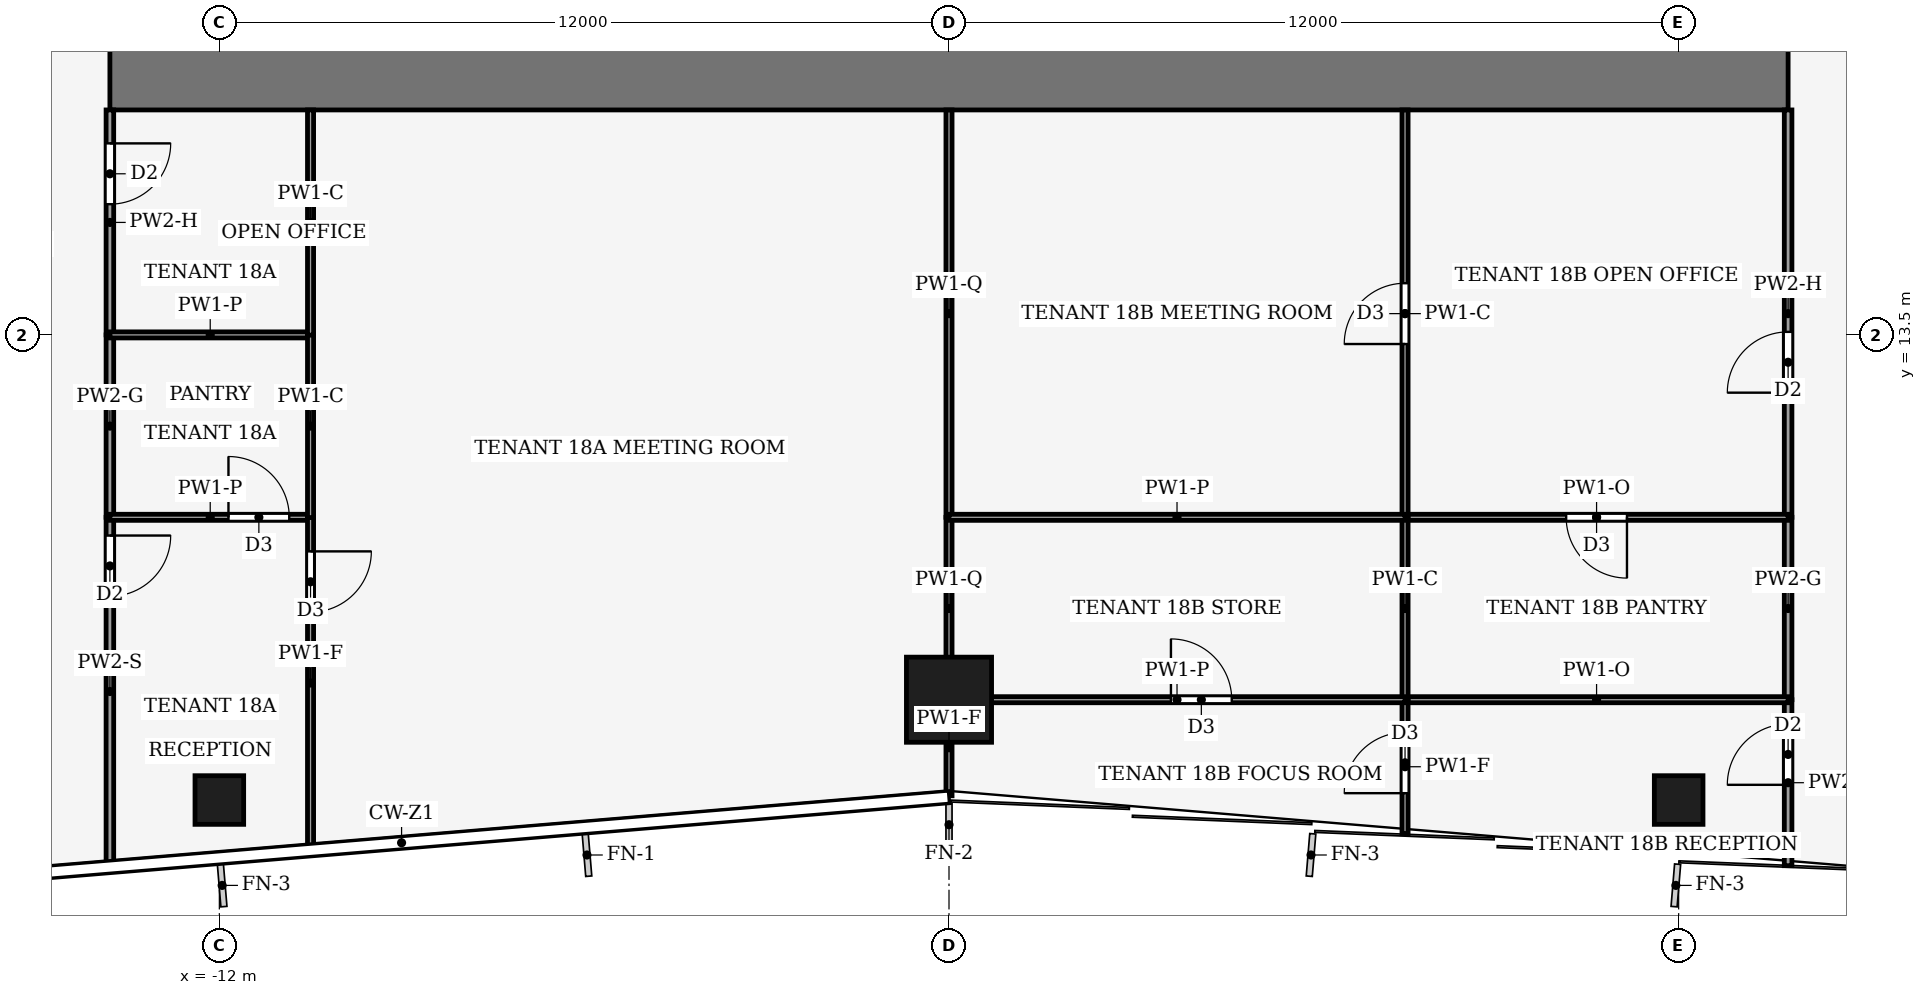
"""IFC4 building model, lengths in metres.
Left out: names, types, materials, properties, quantities, classifications, styles, units other than length and angle.
Written with IfcOpenShell. Run it as: python <this file> out.ifc"""

import sys

from ifc_helpers import new_model, si_unit, direction, frame, frame_2d, origin, origin_2d, place, context, subcontext, project, spatial, rectangle, hollow_rectangle, extrude, element, fill, save


model = new_model("IFC4")
c1 = context("Model", 3, precision=1e-05, world=origin(), true_north=direction((0.0, 1.0)))
c2 = subcontext(c1, "Body", "Model", "MODEL_VIEW")
j1 = project(units=[si_unit("LENGTHUNIT", "METRE"), si_unit("PLANEANGLEUNIT", "RADIAN")], contexts=[c1])
p1 = place(None, origin())
s1 = spatial("IfcSite", under=j1, at=p1, CompositionType="ELEMENT")
p2 = place(p1, origin())
s2 = spatial("IfcBuilding", under=s1, at=p2, CompositionType="ELEMENT")
p3 = place(p2, frame((0.0, 0.0, 82.0)))
s3 = spatial("IfcBuildingStorey", under=s2, at=p3, CompositionType="ELEMENT", Elevation=82.0)
p4 = place(p3, frame((-13.8, 17.8, -0.13), z_axis=(0.0, 0.0, 1.0), x_axis=(1.0, 0.0, 0.0)))
e1 = element("IfcWall", 1, at=p4, inside=s3, PredefinedType="SHEAR", context=c2, shape_type="SweptSolid", body=[
    extrude(rectangle(XDim=27.6, YDim=1.2, at=frame_2d((13.8, 0.0))), origin(), (0.0, 0.0, 1.0), 4.0),
])
p5 = place(p3, frame((0.0, 7.5, 0.0), z_axis=(0.0, 0.0, 1.0), x_axis=(1.0, 0.0, 0.0)))
e2 = element("IfcColumn", 2, at=p5, inside=s3, PredefinedType="COLUMN", context=c2, shape_type="SweptSolid", body=[
    extrude(hollow_rectangle(XDim=1.4, YDim=1.4, WallThickness=0.08, at=origin_2d()), origin(), (0.0, 0.0, 1.0), 4.0),
])
for number, where, z_axis, x_axis in (
    (3, (-12.0, 5.85, 0.0), (0.0, 0.0, 1.0), (1.0, 0.0, 0.0)),
    (4, (12.0, 5.85, 0.0), (0.0, 0.0, 1.0), (1.0, 0.0, 0.0)),
):
    element("IfcColumn", number, at=place(p3, frame(where, z_axis=z_axis, x_axis=x_axis)), inside=s3, PredefinedType="COLUMN", context=c2, shape_type="SweptSolid", body=[
        extrude(hollow_rectangle(XDim=0.8, YDim=0.8, WallThickness=0.04, at=origin_2d()), origin(), (0.0, 0.0, 1.0), 4.0),
    ])
p6 = place(p3, frame((-13.8, 10.5, 0.0), z_axis=(0.0, 0.0, 1.0), x_axis=(0.0, -1.0, 0.0)))
e5 = element("IfcWall", 5, at=p6, inside=s3, PredefinedType="PARTITIONING", context=c2, shape_type="SweptSolid", body=[
    extrude(rectangle(XDim=5.73, YDim=0.125, at=frame_2d((2.865, 0.0))), origin(), (0.0, 0.0, 1.0), 3.04),
])
p7 = place(p6, frame((0.3, 0.0, 0.0)))
e6 = element("IfcOpeningElement", 6, at=p7, cuts=e5, PredefinedType="OPENING", context=c2, shape_type="SweptSolid", body=[
    extrude(rectangle(XDim=1.0, YDim=2.1, at=frame_2d((0.5, 1.05))), frame((0.0, 0.073, 0.0), z_axis=(0.0, -1.0, 0.0), x_axis=(1.0, 0.0, 0.0)), (0.0, 0.0, 1.0), 0.145),
])
p8 = place(p3, frame((-13.8, 10.5, 0.0), z_axis=(0.0, 0.0, 1.0), x_axis=(0.0, 1.0, 0.0)))
e7 = element("IfcWall", 7, at=p8, inside=s3, PredefinedType="PARTITIONING", context=c2, shape_type="SweptSolid", body=[
    extrude(rectangle(XDim=3.0, YDim=0.125, at=frame_2d((1.5, 0.0))), origin(), (0.0, 0.0, 1.0), 3.87),
])
p9 = place(p3, frame((-13.8, 17.2, 0.0), z_axis=(0.0, 0.0, 1.0), x_axis=(0.0, -1.0, 0.0)))
e8 = element("IfcWall", 8, at=p9, inside=s3, PredefinedType="PARTITIONING", context=c2, shape_type="SweptSolid", body=[
    extrude(rectangle(XDim=3.7, YDim=0.125, at=frame_2d((1.85, 0.0))), origin(), (0.0, 0.0, 1.0), 3.14),
])
p10 = place(p9, frame((0.55, 0.0, 0.0)))
e9 = element("IfcOpeningElement", 9, at=p10, cuts=e8, PredefinedType="OPENING", context=c2, shape_type="SweptSolid", body=[
    extrude(rectangle(XDim=1.0, YDim=2.1, at=frame_2d((0.5, 1.05))), frame((0.0, 0.073, 0.0), z_axis=(0.0, -1.0, 0.0), x_axis=(1.0, 0.0, 0.0)), (0.0, 0.0, 1.0), 0.145),
])
p11 = place(p3, frame((13.8, 4.77, 0.0), z_axis=(0.0, 0.0, 1.0), x_axis=(0.0, 1.0, 0.0)))
e10 = element("IfcWall", 10, at=p11, inside=s3, PredefinedType="PARTITIONING", context=c2, shape_type="SweptSolid", body=[
    extrude(rectangle(XDim=2.73, YDim=0.125, at=frame_2d((1.365, 0.0))), origin(), (0.0, 0.0, 1.0), 3.04),
])
p12 = place(p11, frame((1.33, 0.0, 0.0)))
e11 = element("IfcOpeningElement", 11, at=p12, cuts=e10, PredefinedType="OPENING", context=c2, shape_type="SweptSolid", body=[
    extrude(rectangle(XDim=1.0, YDim=2.1, at=frame_2d((0.5, 1.05))), frame((0.0, 0.073, 0.0), z_axis=(0.0, -1.0, 0.0), x_axis=(1.0, 0.0, 0.0)), (0.0, 0.0, 1.0), 0.145),
])
p13 = place(p3, frame((13.8, 10.5, 0.0), z_axis=(0.0, 0.0, 1.0), x_axis=(0.0, -1.0, 0.0)))
e12 = element("IfcWall", 12, at=p13, inside=s3, PredefinedType="PARTITIONING", context=c2, shape_type="SweptSolid", body=[
    extrude(rectangle(XDim=3.0, YDim=0.125, at=frame_2d((1.5, 0.0))), origin(), (0.0, 0.0, 1.0), 3.87),
])
p14 = place(p3, frame((13.8, 10.5, 0.0), z_axis=(0.0, 0.0, 1.0), x_axis=(0.0, 1.0, 0.0)))
e13 = element("IfcWall", 13, at=p14, inside=s3, PredefinedType="PARTITIONING", context=c2, shape_type="SweptSolid", body=[
    extrude(rectangle(XDim=6.7, YDim=0.125, at=frame_2d((3.35, 0.0))), origin(), (0.0, 0.0, 1.0), 3.14),
])
p15 = place(p14, frame((2.05, 0.0, 0.0)))
e14 = element("IfcOpeningElement", 14, at=p15, cuts=e13, PredefinedType="OPENING", context=c2, shape_type="SweptSolid", body=[
    extrude(rectangle(XDim=1.0, YDim=2.1, at=frame_2d((0.5, 1.05))), frame((0.0, 0.073, 0.0), z_axis=(0.0, -1.0, 0.0), x_axis=(1.0, 0.0, 0.0)), (0.0, 0.0, 1.0), 0.145),
])
p16 = place(p3, frame((-13.8, 10.5, 0.0), z_axis=(0.0, 0.0, 1.0), x_axis=(1.0, 0.0, 0.0)))
e15 = element("IfcWall", 15, at=p16, inside=s3, PredefinedType="PARTITIONING", context=c2, shape_type="SweptSolid", body=[
    extrude(rectangle(XDim=3.3, YDim=0.1, at=frame_2d((1.65, 0.0))), origin(), (0.0, 0.0, 1.0), 3.44),
])
p17 = place(p16, frame((1.95, 0.0, 0.0)))
e16 = element("IfcOpeningElement", 16, at=p17, cuts=e15, PredefinedType="OPENING", context=c2, shape_type="SweptSolid", body=[
    extrude(rectangle(XDim=1.0, YDim=2.1, at=frame_2d((0.5, 1.05))), frame((0.0, 0.06, 0.0), z_axis=(0.0, -1.0, 0.0), x_axis=(1.0, 0.0, 0.0)), (0.0, 0.0, 1.0), 0.12),
])
p18 = place(p3, frame((-10.5, 10.504, 0.0), z_axis=(0.0, 0.0, 1.0), x_axis=(0.0, -1.0, 0.0)))
e17 = element("IfcWall", 17, at=p18, inside=s3, PredefinedType="PARTITIONING", context=c2, shape_type="SweptSolid", body=[
    extrude(rectangle(XDim=5.459, YDim=0.1, at=frame_2d((2.729, 0.0))), origin(), (0.0, 0.0, 1.0), 3.04),
])
p19 = place(p18, frame((0.564, 0.0, 0.0)))
e18 = element("IfcOpeningElement", 18, at=p19, cuts=e17, PredefinedType="OPENING", context=c2, shape_type="SweptSolid", body=[
    extrude(rectangle(XDim=1.0, YDim=2.1, at=frame_2d((0.5, 1.05))), frame((0.0, 0.06, 0.0), z_axis=(0.0, -1.0, 0.0), x_axis=(1.0, 0.0, 0.0)), (0.0, 0.0, 1.0), 0.12),
])
p20 = place(p3, frame((-10.5, 13.5, 0.0), z_axis=(0.0, 0.0, 1.0), x_axis=(-1.0, 0.0, 0.0)))
e19 = element("IfcWall", 19, at=p20, inside=s3, PredefinedType="PARTITIONING", context=c2, shape_type="SweptSolid", body=[
    extrude(rectangle(XDim=3.3, YDim=0.1, at=frame_2d((1.65, 0.0))), origin(), (0.0, 0.0, 1.0), 3.44),
])
p21 = place(p3, frame((-10.5, 10.496, 0.0), z_axis=(0.0, 0.0, 1.0), x_axis=(0.0, 1.0, 0.0)))
e20 = element("IfcWall", 20, at=p21, inside=s3, PredefinedType="PARTITIONING", context=c2, shape_type="SweptSolid", body=[
    extrude(rectangle(XDim=3.008, YDim=0.1, at=frame_2d((1.504, 0.0))), origin(), (0.0, 0.0, 1.0), 3.87),
])
p22 = place(p3, frame((-10.5, 13.496, 0.0), z_axis=(0.0, 0.0, 1.0), x_axis=(0.0, 1.0, 0.0)))
e21 = element("IfcWall", 21, at=p22, inside=s3, PredefinedType="PARTITIONING", context=c2, shape_type="SweptSolid", body=[
    extrude(rectangle(XDim=3.704, YDim=0.1, at=frame_2d((1.852, 0.0))), origin(), (0.0, 0.0, 1.0), 3.87),
])
p23 = place(p3, frame((0.0, 5.92, 0.0), z_axis=(0.0, 0.0, 1.0), x_axis=(0.0, 1.0, 0.0)))
e22 = element("IfcWall", 22, at=p23, inside=s3, PredefinedType="PARTITIONING", context=c2, shape_type="SweptSolid", body=[
    extrude(rectangle(XDim=1.58, YDim=0.1, at=frame_2d((0.79, 0.0))), origin(), (0.0, 0.0, 1.0), 3.04),
])
p24 = place(p3, frame((0.0, 7.5, 0.0), z_axis=(0.0, 0.0, 1.0), x_axis=(0.0, 1.0, 0.0)))
e23 = element("IfcWall", 23, at=p24, inside=s3, PredefinedType="PARTITIONING", context=c2, shape_type="SweptSolid", body=[
    extrude(rectangle(XDim=3.0, YDim=0.1, at=frame_2d((1.5, 0.0))), origin(), (0.0, 0.0, 1.0), 3.48),
])
p25 = place(p3, frame((0.0, 10.5, 0.0), z_axis=(0.0, 0.0, 1.0), x_axis=(0.0, 1.0, 0.0)))
e24 = element("IfcWall", 24, at=p25, inside=s3, PredefinedType="PARTITIONING", context=c2, shape_type="SweptSolid", body=[
    extrude(rectangle(XDim=6.7, YDim=0.1, at=frame_2d((3.35, 0.0))), origin(), (0.0, 0.0, 1.0), 3.48),
])
p26 = place(p3, frame((13.8, 7.5, 0.0), z_axis=(0.0, 0.0, 1.0), x_axis=(-1.0, 0.0, 0.0)))
e25 = element("IfcWall", 25, at=p26, inside=s3, PredefinedType="PARTITIONING", context=c2, shape_type="SweptSolid", body=[
    extrude(rectangle(XDim=6.3, YDim=0.1, at=frame_2d((3.15, 0.0))), origin(), (0.0, 0.0, 1.0), 3.39),
])
p27 = place(p3, frame((7.5, 5.295, 0.0), z_axis=(0.0, 0.0, 1.0), x_axis=(0.0, 1.0, 0.0)))
e26 = element("IfcWall", 26, at=p27, inside=s3, PredefinedType="PARTITIONING", context=c2, shape_type="SweptSolid", body=[
    extrude(rectangle(XDim=2.205, YDim=0.1, at=frame_2d((1.103, 0.0))), origin(), (0.0, 0.0, 1.0), 3.04),
])
p28 = place(p27, frame((0.667, 0.0, 0.0)))
e27 = element("IfcOpeningElement", 27, at=p28, cuts=e26, PredefinedType="OPENING", context=c2, shape_type="SweptSolid", body=[
    extrude(rectangle(XDim=1.0, YDim=2.1, at=frame_2d((0.5, 1.05))), frame((0.0, 0.06, 0.0), z_axis=(0.0, -1.0, 0.0), x_axis=(1.0, 0.0, 0.0)), (0.0, 0.0, 1.0), 0.12),
])
p29 = place(p3, frame((13.8, 10.5, 0.0), z_axis=(0.0, 0.0, 1.0), x_axis=(-1.0, 0.0, 0.0)))
e28 = element("IfcWall", 28, at=p29, inside=s3, PredefinedType="PARTITIONING", context=c2, shape_type="SweptSolid", body=[
    extrude(rectangle(XDim=6.3, YDim=0.1, at=frame_2d((3.15, 0.0))), origin(), (0.0, 0.0, 1.0), 3.39),
])
p30 = place(p29, frame((2.65, 0.0, 0.0)))
e29 = element("IfcOpeningElement", 29, at=p30, cuts=e28, PredefinedType="OPENING", context=c2, shape_type="SweptSolid", body=[
    extrude(rectangle(XDim=1.0, YDim=2.1, at=frame_2d((0.5, 1.05))), frame((0.0, 0.06, 0.0), z_axis=(0.0, -1.0, 0.0), x_axis=(1.0, 0.0, 0.0)), (0.0, 0.0, 1.0), 0.12),
])
p31 = place(p3, frame((7.5, 10.5, 0.0), z_axis=(0.0, 0.0, 1.0), x_axis=(0.0, -1.0, 0.0)))
e30 = element("IfcWall", 30, at=p31, inside=s3, PredefinedType="PARTITIONING", context=c2, shape_type="SweptSolid", body=[
    extrude(rectangle(XDim=3.0, YDim=0.1, at=frame_2d((1.5, 0.0))), origin(), (0.0, 0.0, 1.0), 3.87),
])
p32 = place(p3, frame((7.5, 10.5, 0.0), z_axis=(0.0, 0.0, 1.0), x_axis=(0.0, 1.0, 0.0)))
e31 = element("IfcWall", 31, at=p32, inside=s3, PredefinedType="PARTITIONING", context=c2, shape_type="SweptSolid", body=[
    extrude(rectangle(XDim=6.7, YDim=0.1, at=frame_2d((3.35, 0.0))), origin(), (0.0, 0.0, 1.0), 3.87),
])
p33 = place(p32, frame((2.85, 0.0, 0.0)))
e32 = element("IfcOpeningElement", 32, at=p33, cuts=e31, PredefinedType="OPENING", context=c2, shape_type="SweptSolid", body=[
    extrude(rectangle(XDim=1.0, YDim=2.1, at=frame_2d((0.5, 1.05))), frame((0.0, 0.06, 0.0), z_axis=(0.0, -1.0, 0.0), x_axis=(1.0, 0.0, 0.0)), (0.0, 0.0, 1.0), 0.12),
])
p34 = place(p3, frame((0.0, 7.5, 0.0), z_axis=(0.0, 0.0, 1.0), x_axis=(1.0, 0.0, 0.0)))
e33 = element("IfcWall", 33, at=p34, inside=s3, PredefinedType="PARTITIONING", context=c2, shape_type="SweptSolid", body=[
    extrude(rectangle(XDim=7.5, YDim=0.1, at=frame_2d((3.75, 0.0))), origin(), (0.0, 0.0, 1.0), 3.44),
])
p35 = place(p34, frame((3.65, 0.0, 0.0)))
e34 = element("IfcOpeningElement", 34, at=p35, cuts=e33, PredefinedType="OPENING", context=c2, shape_type="SweptSolid", body=[
    extrude(rectangle(XDim=1.0, YDim=2.1, at=frame_2d((0.5, 1.05))), frame((0.0, 0.06, 0.0), z_axis=(0.0, -1.0, 0.0), x_axis=(1.0, 0.0, 0.0)), (0.0, 0.0, 1.0), 0.12),
])
p36 = place(p3, frame((7.5, 10.5, 0.0), z_axis=(0.0, 0.0, 1.0), x_axis=(-1.0, 0.0, 0.0)))
e35 = element("IfcWall", 35, at=p36, inside=s3, PredefinedType="PARTITIONING", context=c2, shape_type="SweptSolid", body=[
    extrude(rectangle(XDim=7.5, YDim=0.1, at=frame_2d((3.75, 0.0))), origin(), (0.0, 0.0, 1.0), 3.44),
])
p37 = place(p7, origin())
e36 = element("IfcDoor", 36, at=p37, inside=s3, OperationType="SINGLE_SWING_LEFT", PredefinedType="DOOR", context=c2, shape_type="SweptSolid", body=[
    extrude(rectangle(XDim=1.0, YDim=2.1, at=frame_2d((0.5, 1.05))), frame((0.0, 0.025, 0.0), z_axis=(0.0, -1.0, 0.0), x_axis=(1.0, 0.0, 0.0)), (0.0, 0.0, 1.0), 0.05),
])
fill(e6, e36)
p38 = place(p10, origin())
e37 = element("IfcDoor", 37, at=p38, inside=s3, OperationType="SINGLE_SWING_LEFT", PredefinedType="DOOR", context=c2, shape_type="SweptSolid", body=[
    extrude(rectangle(XDim=1.0, YDim=2.1, at=frame_2d((0.5, 1.05))), frame((0.0, 0.025, 0.0), z_axis=(0.0, -1.0, 0.0), x_axis=(1.0, 0.0, 0.0)), (0.0, 0.0, 1.0), 0.05),
])
fill(e9, e37)
p39 = place(p12, origin())
e38 = element("IfcDoor", 38, at=p39, inside=s3, OperationType="SINGLE_SWING_RIGHT", PredefinedType="DOOR", context=c2, shape_type="SweptSolid", body=[
    extrude(rectangle(XDim=1.0, YDim=2.1, at=frame_2d((0.5, 1.05))), frame((0.0, 0.025, 0.0), z_axis=(0.0, -1.0, 0.0), x_axis=(1.0, 0.0, 0.0)), (0.0, 0.0, 1.0), 0.05),
])
fill(e11, e38)
p40 = place(p15, origin())
e39 = element("IfcDoor", 39, at=p40, inside=s3, OperationType="SINGLE_SWING_LEFT", PredefinedType="DOOR", context=c2, shape_type="SweptSolid", body=[
    extrude(rectangle(XDim=1.0, YDim=2.1, at=frame_2d((0.5, 1.05))), frame((0.0, 0.025, 0.0), z_axis=(0.0, -1.0, 0.0), x_axis=(1.0, 0.0, 0.0)), (0.0, 0.0, 1.0), 0.05),
])
fill(e14, e39)
p41 = place(p17, origin())
e40 = element("IfcDoor", 40, at=p41, inside=s3, OperationType="SINGLE_SWING_RIGHT", PredefinedType="DOOR", context=c2, shape_type="SweptSolid", body=[
    extrude(rectangle(XDim=1.0, YDim=2.1, at=frame_2d((0.5, 1.05))), frame((0.0, 0.025, 0.0), z_axis=(0.0, -1.0, 0.0), x_axis=(1.0, 0.0, 0.0)), (0.0, 0.0, 1.0), 0.05),
])
fill(e16, e40)
p42 = place(p19, origin())
e41 = element("IfcDoor", 41, at=p42, inside=s3, OperationType="SINGLE_SWING_LEFT", PredefinedType="DOOR", context=c2, shape_type="SweptSolid", body=[
    extrude(rectangle(XDim=1.0, YDim=2.1, at=frame_2d((0.5, 1.05))), frame((0.0, 0.025, 0.0), z_axis=(0.0, -1.0, 0.0), x_axis=(1.0, 0.0, 0.0)), (0.0, 0.0, 1.0), 0.05),
])
fill(e18, e41)
p43 = place(p28, origin())
e42 = element("IfcDoor", 42, at=p43, inside=s3, OperationType="SINGLE_SWING_RIGHT", PredefinedType="DOOR", context=c2, shape_type="SweptSolid", body=[
    extrude(rectangle(XDim=1.0, YDim=2.1, at=frame_2d((0.5, 1.05))), frame((0.0, 0.025, 0.0), z_axis=(0.0, -1.0, 0.0), x_axis=(1.0, 0.0, 0.0)), (0.0, 0.0, 1.0), 0.05),
])
fill(e27, e42)
p44 = place(p30, origin())
e43 = element("IfcDoor", 43, at=p44, inside=s3, OperationType="SINGLE_SWING_RIGHT", PredefinedType="DOOR", context=c2, shape_type="SweptSolid", body=[
    extrude(rectangle(XDim=1.0, YDim=2.1, at=frame_2d((0.5, 1.05))), frame((0.0, 0.025, 0.0), z_axis=(0.0, -1.0, 0.0), x_axis=(1.0, 0.0, 0.0)), (0.0, 0.0, 1.0), 0.05),
])
fill(e29, e43)
p45 = place(p33, origin())
e44 = element("IfcDoor", 44, at=p45, inside=s3, OperationType="SINGLE_SWING_LEFT", PredefinedType="DOOR", context=c2, shape_type="SweptSolid", body=[
    extrude(rectangle(XDim=1.0, YDim=2.1, at=frame_2d((0.5, 1.05))), frame((0.0, 0.025, 0.0), z_axis=(0.0, -1.0, 0.0), x_axis=(1.0, 0.0, 0.0)), (0.0, 0.0, 1.0), 0.05),
])
fill(e32, e44)
p46 = place(p35, origin())
e45 = element("IfcDoor", 45, at=p46, inside=s3, OperationType="SINGLE_SWING_RIGHT", PredefinedType="DOOR", context=c2, shape_type="SweptSolid", body=[
    extrude(rectangle(XDim=1.0, YDim=2.1, at=frame_2d((0.5, 1.05))), frame((0.0, 0.025, 0.0), z_axis=(0.0, -1.0, 0.0), x_axis=(1.0, 0.0, 0.0)), (0.0, 0.0, 1.0), 0.05),
])
fill(e34, e45)
save(model, sys.argv[1])
